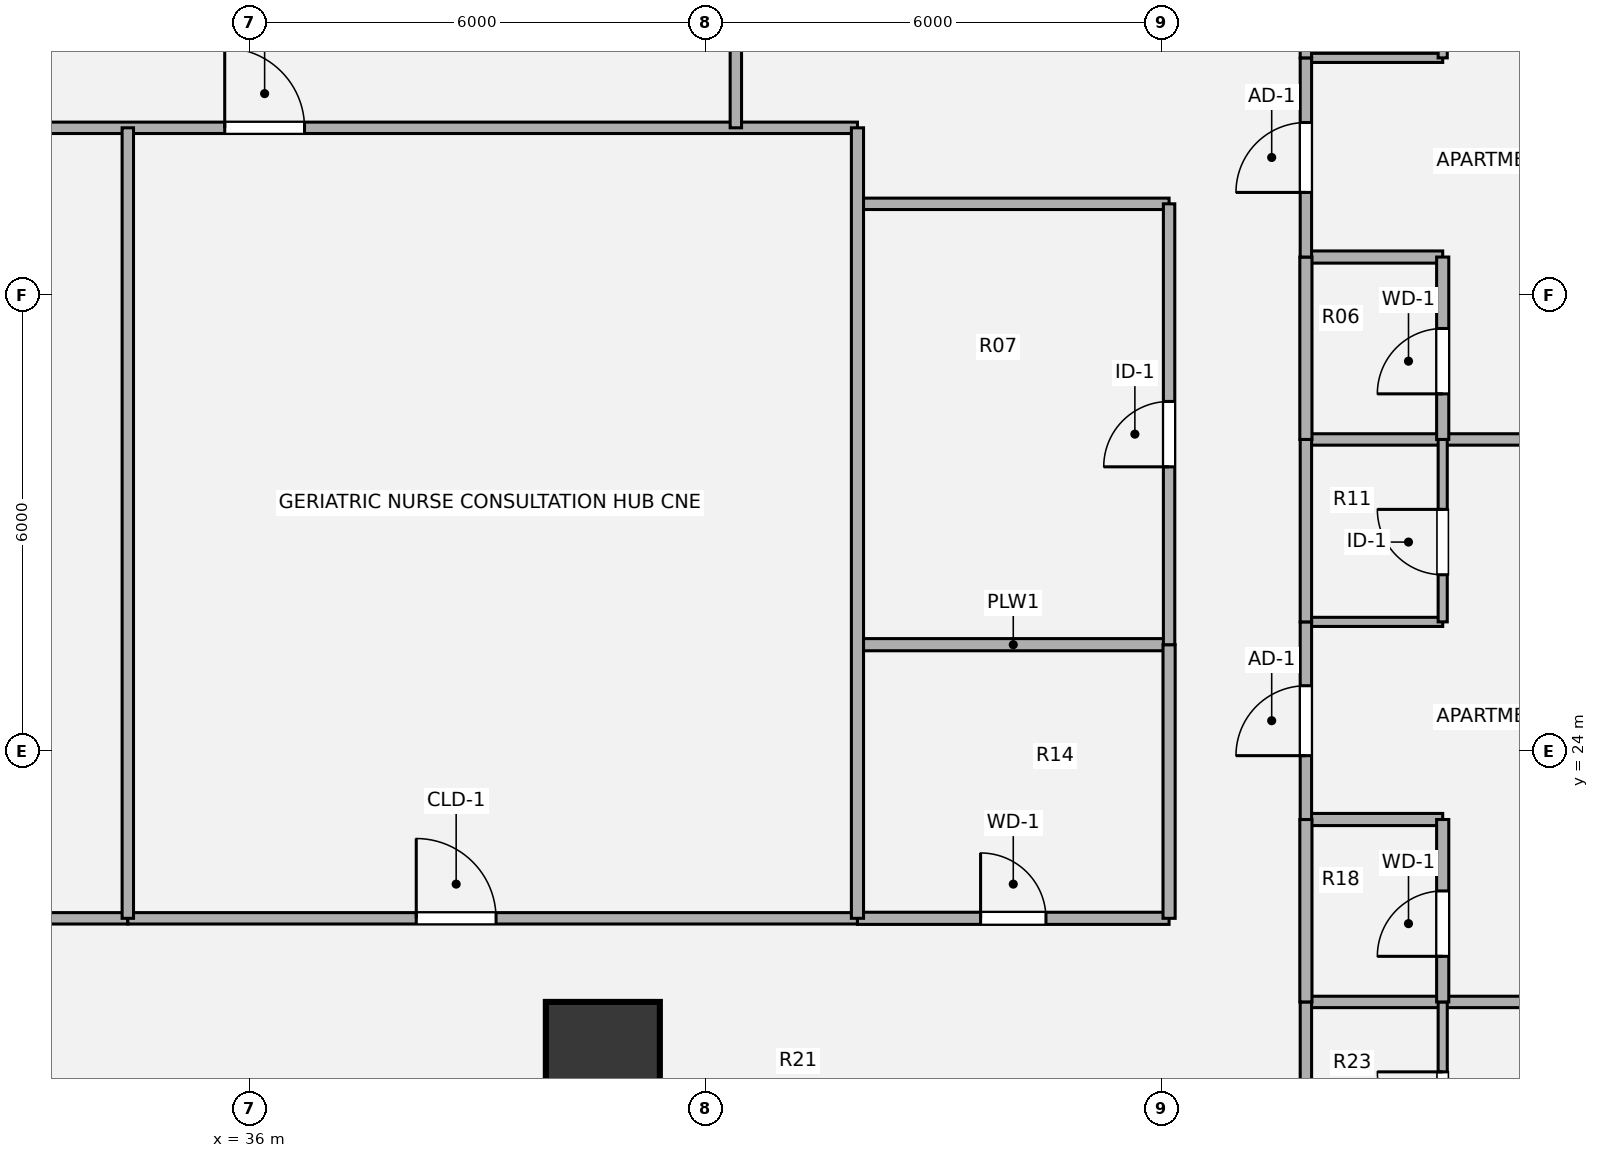
"""IFC4 building model, lengths in metres.
Left out: names, types, materials, properties, quantities, classifications, styles, units other than length and angle.
Written with IfcOpenShell. Run it as: python <this file> out.ifc"""

import sys

from ifc_helpers import new_model, si_unit, direction, frame, frame_2d, origin, origin_2d, place, context, subcontext, project, spatial, rectangle, hollow_circle, extrude, source, transform, mapped, element, fill, save


model = new_model("IFC4")
c1 = context("Model", 3, precision=1e-05, world=origin(), true_north=direction((0.0, 1.0)))
c2 = subcontext(c1, "Body", "Model", "MODEL_VIEW")
j1 = project(units=[si_unit("LENGTHUNIT", "METRE"), si_unit("PLANEANGLEUNIT", "RADIAN")], contexts=[c1])
p1 = place(None, origin())
s1 = spatial("IfcSite", under=j1, at=p1, CompositionType="ELEMENT")
p2 = place(p1, origin())
s2 = spatial("IfcBuilding", under=s1, at=p2, CompositionType="ELEMENT")
p3 = place(p2, frame((0.0, 0.0, 30.78)))
s3 = spatial("IfcBuildingStorey", under=s2, at=p3, CompositionType="ELEMENT", Elevation=30.78)
m1 = source(origin(), c2, "Body", "SweptSolid", [
    extrude(hollow_circle(Radius=0.75, WallThickness=0.05, at=origin_2d()), origin(), (0.0, 0.0, 1.0), 3.78),
])
p4 = place(p3, frame((40.65, 19.95, 0.0), z_axis=(0.0, 0.0, 1.0), x_axis=(1.0, 0.0, 0.0)))
e1 = element("IfcColumn", 1, at=p4, inside=s3, PredefinedType="COLUMN", context=c2, shape_type="MappedRepresentation", body=[
    mapped(m1, transform((0.0, 0.0, 0.0), x_axis=(1.0, 0.0, 0.0), y_axis=(0.0, 1.0, 0.0), z_axis=(0.0, 0.0, 1.0), scale=1.0)),
])
p5 = place(p3, frame((49.9, 20.7, 0.0), z_axis=(0.0, 0.0, 1.0), x_axis=(1.0, 0.0, 0.0)))
e2 = element("IfcWall", 2, at=p5, inside=s3, PredefinedType="PARTITIONING", context=c2, shape_type="SweptSolid", body=[
    extrude(rectangle(XDim=10.02, YDim=0.15, at=frame_2d((5.01, 0.0))), origin(), (0.0, 0.0, 1.0), 2.982),
])
p6 = place(p3, frame((23.9, 21.8, 0.0), z_axis=(0.0, 0.0, 1.0), x_axis=(1.0, 0.0, 0.0)))
e3 = element("IfcWall", 3, at=p6, inside=s3, PredefinedType="PARTITIONING", context=c2, shape_type="SweptSolid", body=[
    extrude(rectangle(XDim=10.5, YDim=0.15, at=frame_2d((5.25, 0.0))), origin(), (0.0, 0.0, 1.0), 2.982),
])
p7 = place(p6, frame((4.875, 0.0, 0.0)))
e4 = element("IfcOpeningElement", 4, at=p7, cuts=e3, PredefinedType="OPENING", context=c2, shape_type="SweptSolid", body=[
    extrude(rectangle(XDim=1.05, YDim=2.1, at=origin_2d()), frame((0.525, 0.085, 1.05), z_axis=(0.0, -1.0, 0.0), x_axis=(1.0, 0.0, 0.0)), (0.0, 0.0, 1.0), 0.17),
])
p8 = place(p3, frame((34.4, 21.8, 0.0), z_axis=(0.0, 0.0, 1.0), x_axis=(1.0, 0.0, 0.0)))
e5 = element("IfcWall", 5, at=p8, inside=s3, PredefinedType="PARTITIONING", context=c2, shape_type="SweptSolid", body=[
    extrude(rectangle(XDim=9.6, YDim=0.15, at=frame_2d((4.8, 0.0))), origin(), (0.0, 0.0, 1.0), 2.982),
])
p9 = place(p8, frame((3.795, 0.0, 0.0)))
e6 = element("IfcOpeningElement", 6, at=p9, cuts=e5, PredefinedType="OPENING", context=c2, shape_type="SweptSolid", body=[
    extrude(rectangle(XDim=1.05, YDim=2.1, at=origin_2d()), frame((0.525, 0.085, 1.05), z_axis=(0.0, -1.0, 0.0), x_axis=(1.0, 0.0, 0.0)), (0.0, 0.0, 1.0), 0.17),
])
p10 = place(p3, frame((44.0, 21.8, 0.0), z_axis=(0.0, 0.0, 1.0), x_axis=(1.0, 0.0, 0.0)))
e7 = element("IfcWall", 7, at=p10, inside=s3, PredefinedType="PLUMBINGWALL", context=c2, shape_type="SweptSolid", body=[
    extrude(rectangle(XDim=4.1, YDim=0.16, at=frame_2d((2.05, 0.0))), origin(), (0.0, 0.0, 1.0), 2.982),
])
p11 = place(p10, frame((1.62, 0.0, 0.0)))
e8 = element("IfcOpeningElement", 8, at=p11, cuts=e7, PredefinedType="OPENING", context=c2, shape_type="SweptSolid", body=[
    extrude(rectangle(XDim=0.86, YDim=2.1, at=origin_2d()), frame((0.43, 0.09, 1.05), z_axis=(0.0, -1.0, 0.0), x_axis=(1.0, 0.0, 0.0)), (0.0, 0.0, 1.0), 0.18),
])
p12 = place(p3, frame((49.9, 23.1, 0.0), z_axis=(0.0, 0.0, 1.0), x_axis=(1.0, 0.0, 0.0)))
e9 = element("IfcWall", 9, at=p12, inside=s3, PredefinedType="PLUMBINGWALL", context=c2, shape_type="SweptSolid", body=[
    extrude(rectangle(XDim=1.8, YDim=0.16, at=frame_2d((0.9, 0.0))), origin(), (0.0, 0.0, 1.0), 3.055),
])
p13 = place(p3, frame((44.0, 25.4, 0.0), z_axis=(0.0, 0.0, 1.0), x_axis=(1.0, 0.0, 0.0)))
e10 = element("IfcWall", 10, at=p13, inside=s3, PredefinedType="PLUMBINGWALL", context=c2, shape_type="SweptSolid", body=[
    extrude(rectangle(XDim=4.1, YDim=0.16, at=frame_2d((2.05, 0.0))), origin(), (0.0, 0.0, 1.0), 3.055),
])
p14 = place(p3, frame((49.9, 25.7, 0.0), z_axis=(0.0, 0.0, 1.0), x_axis=(1.0, 0.0, 0.0)))
e11 = element("IfcWall", 11, at=p14, inside=s3, PredefinedType="PARTITIONING", context=c2, shape_type="SweptSolid", body=[
    extrude(rectangle(XDim=1.8, YDim=0.12, at=frame_2d((0.9, 0.0))), origin(), (0.0, 0.0, 1.0), 2.982),
])
p15 = place(p3, frame((49.9, 28.1, 0.0), z_axis=(0.0, 0.0, 1.0), x_axis=(1.0, 0.0, 0.0)))
e12 = element("IfcWall", 12, at=p15, inside=s3, PredefinedType="PARTITIONING", context=c2, shape_type="SweptSolid", body=[
    extrude(rectangle(XDim=10.02, YDim=0.15, at=frame_2d((5.01, 0.0))), origin(), (0.0, 0.0, 1.0), 2.982),
])
p16 = place(p3, frame((49.9, 30.5, 0.0), z_axis=(0.0, 0.0, 1.0), x_axis=(1.0, 0.0, 0.0)))
e13 = element("IfcWall", 13, at=p16, inside=s3, PredefinedType="PLUMBINGWALL", context=c2, shape_type="SweptSolid", body=[
    extrude(rectangle(XDim=1.8, YDim=0.16, at=frame_2d((0.9, 0.0))), origin(), (0.0, 0.0, 1.0), 2.903),
])
p17 = place(p3, frame((44.0, 31.2, 0.0), z_axis=(0.0, 0.0, 1.0), x_axis=(1.0, 0.0, 0.0)))
e14 = element("IfcWall", 14, at=p17, inside=s3, PredefinedType="PARTITIONING", context=c2, shape_type="SweptSolid", body=[
    extrude(rectangle(XDim=4.1, YDim=0.15, at=frame_2d((2.05, 0.0))), origin(), (0.0, 0.0, 1.0), 3.5),
])
p18 = place(p3, frame((23.9, 32.2, 0.0), z_axis=(0.0, 0.0, 1.0), x_axis=(1.0, 0.0, 0.0)))
e15 = element("IfcWall", 15, at=p18, inside=s3, PredefinedType="PARTITIONING", context=c2, shape_type="SweptSolid", body=[
    extrude(rectangle(XDim=20.1, YDim=0.15, at=frame_2d((10.05, 0.0))), origin(), (0.0, 0.0, 1.0), 3.259),
])
p19 = place(p18, frame((11.775, 0.0, 0.0)))
e16 = element("IfcOpeningElement", 16, at=p19, cuts=e15, PredefinedType="OPENING", context=c2, shape_type="SweptSolid", body=[
    extrude(rectangle(XDim=1.05, YDim=2.1, at=origin_2d()), frame((0.525, 0.085, 1.05), z_axis=(0.0, -1.0, 0.0), x_axis=(1.0, 0.0, 0.0)), (0.0, 0.0, 1.0), 0.17),
])
p20 = place(p3, frame((49.9, 33.12, 0.0), z_axis=(0.0, 0.0, 1.0), x_axis=(1.0, 0.0, 0.0)))
e17 = element("IfcWall", 17, at=p20, inside=s3, PredefinedType="PARTITIONING", context=c2, shape_type="SweptSolid", body=[
    extrude(rectangle(XDim=1.8, YDim=0.12, at=frame_2d((0.9, 0.0))), origin(), (0.0, 0.0, 1.0), 3.055),
])
p21 = place(p3, frame((34.4, 21.8, 0.0), z_axis=(0.0, 0.0, 1.0), x_axis=(0.0, 1.0, 0.0)))
e18 = element("IfcWall", 18, at=p21, inside=s3, PredefinedType="PARTITIONING", context=c2, shape_type="SweptSolid", body=[
    extrude(rectangle(XDim=10.4, YDim=0.15, at=frame_2d((5.2, 0.0))), origin(), (0.0, 0.0, 1.0), 3.5),
])
p22 = place(p3, frame((42.4, 32.2, 0.0), z_axis=(0.0, 0.0, 1.0), x_axis=(0.0, 1.0, 0.0)))
e19 = element("IfcWall", 19, at=p22, inside=s3, PredefinedType="PARTITIONING", context=c2, shape_type="SweptSolid", body=[
    extrude(rectangle(XDim=4.595, YDim=0.15, at=frame_2d((2.298, 0.0))), origin(), (0.0, 0.0, 1.0), 3.5),
])
p23 = place(p3, frame((44.0, 21.8, 0.0), z_axis=(0.0, 0.0, 1.0), x_axis=(0.0, 1.0, 0.0)))
e20 = element("IfcWall", 20, at=p23, inside=s3, PredefinedType="PLUMBINGWALL", context=c2, shape_type="SweptSolid", body=[
    extrude(rectangle(XDim=10.4, YDim=0.16, at=frame_2d((5.2, 0.0))), origin(), (0.0, 0.0, 1.0), 3.5),
])
p24 = place(p3, frame((48.1, 21.8, 0.0), z_axis=(0.0, 0.0, 1.0), x_axis=(0.0, 1.0, 0.0)))
e21 = element("IfcWall", 21, at=p24, inside=s3, PredefinedType="PLUMBINGWALL", context=c2, shape_type="SweptSolid", body=[
    extrude(rectangle(XDim=3.6, YDim=0.16, at=frame_2d((1.8, 0.0))), origin(), (0.0, 0.0, 1.0), 3.5),
])
p25 = place(p3, frame((48.1, 25.4, 0.0), z_axis=(0.0, 0.0, 1.0), x_axis=(0.0, 1.0, 0.0)))
e22 = element("IfcWall", 22, at=p25, inside=s3, PredefinedType="PARTITIONING", context=c2, shape_type="SweptSolid", body=[
    extrude(rectangle(XDim=5.8, YDim=0.15, at=frame_2d((2.9, 0.0))), origin(), (0.0, 0.0, 1.0), 3.5),
])
p26 = place(p25, frame((2.34, 0.0, 0.0)))
e23 = element("IfcOpeningElement", 23, at=p26, cuts=e22, PredefinedType="OPENING", context=c2, shape_type="SweptSolid", body=[
    extrude(rectangle(XDim=0.86, YDim=2.1, at=origin_2d()), frame((0.43, 0.085, 1.05), z_axis=(0.0, -1.0, 0.0), x_axis=(1.0, 0.0, 0.0)), (0.0, 0.0, 1.0), 0.17),
])
p27 = place(p3, frame((49.9, 18.3, 0.0), z_axis=(0.0, 0.0, 1.0), x_axis=(0.0, 1.0, 0.0)))
e24 = element("IfcWall", 24, at=p27, inside=s3, PredefinedType="PARTITIONING", context=c2, shape_type="SweptSolid", body=[
    extrude(rectangle(XDim=2.4, YDim=0.15, at=frame_2d((1.2, 0.0))), origin(), (0.0, 0.0, 1.0), 3.5),
])
p28 = place(p3, frame((49.9, 20.7, 0.0), z_axis=(0.0, 0.0, 1.0), x_axis=(0.0, 1.0, 0.0)))
e25 = element("IfcWall", 25, at=p28, inside=s3, PredefinedType="PLUMBINGWALL", context=c2, shape_type="SweptSolid", body=[
    extrude(rectangle(XDim=2.4, YDim=0.16, at=frame_2d((1.2, 0.0))), origin(), (0.0, 0.0, 1.0), 3.5),
])
p29 = place(p3, frame((49.9, 23.1, 0.0), z_axis=(0.0, 0.0, 1.0), x_axis=(0.0, 1.0, 0.0)))
e26 = element("IfcWall", 26, at=p29, inside=s3, PredefinedType="PARTITIONING", context=c2, shape_type="SweptSolid", body=[
    extrude(rectangle(XDim=2.6, YDim=0.15, at=frame_2d((1.3, 0.0))), origin(), (0.0, 0.0, 1.0), 3.5),
])
p30 = place(p29, frame((0.84, 0.0, 0.0)))
e27 = element("IfcOpeningElement", 27, at=p30, cuts=e26, PredefinedType="OPENING", context=c2, shape_type="SweptSolid", body=[
    extrude(rectangle(XDim=0.92, YDim=2.1, at=origin_2d()), frame((0.46, 0.085, 1.05), z_axis=(0.0, -1.0, 0.0), x_axis=(1.0, 0.0, 0.0)), (0.0, 0.0, 1.0), 0.17),
])
p31 = place(p3, frame((49.9, 25.7, 0.0), z_axis=(0.0, 0.0, 1.0), x_axis=(0.0, 1.0, 0.0)))
e28 = element("IfcWall", 28, at=p31, inside=s3, PredefinedType="PARTITIONING", context=c2, shape_type="SweptSolid", body=[
    extrude(rectangle(XDim=2.4, YDim=0.15, at=frame_2d((1.2, 0.0))), origin(), (0.0, 0.0, 1.0), 3.5),
])
p32 = place(p3, frame((49.9, 28.1, 0.0), z_axis=(0.0, 0.0, 1.0), x_axis=(0.0, 1.0, 0.0)))
e29 = element("IfcWall", 29, at=p32, inside=s3, PredefinedType="PLUMBINGWALL", context=c2, shape_type="SweptSolid", body=[
    extrude(rectangle(XDim=2.4, YDim=0.16, at=frame_2d((1.2, 0.0))), origin(), (0.0, 0.0, 1.0), 3.5),
])
p33 = place(p3, frame((49.9, 30.5, 0.0), z_axis=(0.0, 0.0, 1.0), x_axis=(0.0, 1.0, 0.0)))
e30 = element("IfcWall", 30, at=p33, inside=s3, PredefinedType="PARTITIONING", context=c2, shape_type="SweptSolid", body=[
    extrude(rectangle(XDim=2.62, YDim=0.15, at=frame_2d((1.31, 0.0))), origin(), (0.0, 0.0, 1.0), 3.5),
])
p34 = place(p33, frame((0.85, 0.0, 0.0)))
e31 = element("IfcOpeningElement", 31, at=p34, cuts=e30, PredefinedType="OPENING", context=c2, shape_type="SweptSolid", body=[
    extrude(rectangle(XDim=0.92, YDim=2.1, at=origin_2d()), frame((0.46, 0.085, 1.05), z_axis=(0.0, -1.0, 0.0), x_axis=(1.0, 0.0, 0.0)), (0.0, 0.0, 1.0), 0.17),
])
p35 = place(p3, frame((49.9, 33.12, 0.0), z_axis=(0.0, 0.0, 1.0), x_axis=(0.0, 1.0, 0.0)))
e32 = element("IfcWall", 32, at=p35, inside=s3, PredefinedType="PARTITIONING", context=c2, shape_type="SweptSolid", body=[
    extrude(rectangle(XDim=2.8, YDim=0.15, at=frame_2d((1.4, 0.0))), origin(), (0.0, 0.0, 1.0), 3.5),
])
p36 = place(p3, frame((51.7, 18.3, 0.0), z_axis=(0.0, 0.0, 1.0), x_axis=(0.0, 1.0, 0.0)))
e33 = element("IfcWall", 33, at=p36, inside=s3, PredefinedType="PARTITIONING", context=c2, shape_type="SweptSolid", body=[
    extrude(rectangle(XDim=2.4, YDim=0.12, at=frame_2d((1.2, 0.0))), origin(), (0.0, 0.0, 1.0), 3.5),
])
p37 = place(p36, frame((0.62, 0.0, 0.0)))
e34 = element("IfcOpeningElement", 34, at=p37, cuts=e33, PredefinedType="OPENING", context=c2, shape_type="SweptSolid", body=[
    extrude(rectangle(XDim=0.86, YDim=2.1, at=origin_2d()), frame((0.43, 0.07, 1.05), z_axis=(0.0, -1.0, 0.0), x_axis=(1.0, 0.0, 0.0)), (0.0, 0.0, 1.0), 0.14),
])
p38 = place(p3, frame((51.7, 20.7, 0.0), z_axis=(0.0, 0.0, 1.0), x_axis=(0.0, 1.0, 0.0)))
e35 = element("IfcWall", 35, at=p38, inside=s3, PredefinedType="PLUMBINGWALL", context=c2, shape_type="SweptSolid", body=[
    extrude(rectangle(XDim=2.4, YDim=0.16, at=frame_2d((1.2, 0.0))), origin(), (0.0, 0.0, 1.0), 3.5),
])
p39 = place(p38, frame((0.6, 0.0, 0.0)))
e36 = element("IfcOpeningElement", 36, at=p39, cuts=e35, PredefinedType="OPENING", context=c2, shape_type="SweptSolid", body=[
    extrude(rectangle(XDim=0.86, YDim=2.1, at=origin_2d()), frame((0.43, 0.09, 1.05), z_axis=(0.0, -1.0, 0.0), x_axis=(1.0, 0.0, 0.0)), (0.0, 0.0, 1.0), 0.18),
])
p40 = place(p3, frame((51.7, 25.7, 0.0), z_axis=(0.0, 0.0, 1.0), x_axis=(0.0, 1.0, 0.0)))
e37 = element("IfcWall", 37, at=p40, inside=s3, PredefinedType="PARTITIONING", context=c2, shape_type="SweptSolid", body=[
    extrude(rectangle(XDim=2.4, YDim=0.12, at=frame_2d((1.2, 0.0))), origin(), (0.0, 0.0, 1.0), 3.5),
])
p41 = place(p40, frame((0.62, 0.0, 0.0)))
e38 = element("IfcOpeningElement", 38, at=p41, cuts=e37, PredefinedType="OPENING", context=c2, shape_type="SweptSolid", body=[
    extrude(rectangle(XDim=0.86, YDim=2.1, at=origin_2d()), frame((0.43, 0.07, 1.05), z_axis=(0.0, -1.0, 0.0), x_axis=(1.0, 0.0, 0.0)), (0.0, 0.0, 1.0), 0.14),
])
p42 = place(p3, frame((51.7, 28.1, 0.0), z_axis=(0.0, 0.0, 1.0), x_axis=(0.0, 1.0, 0.0)))
e39 = element("IfcWall", 39, at=p42, inside=s3, PredefinedType="PLUMBINGWALL", context=c2, shape_type="SweptSolid", body=[
    extrude(rectangle(XDim=2.4, YDim=0.16, at=frame_2d((1.2, 0.0))), origin(), (0.0, 0.0, 1.0), 3.5),
])
p43 = place(p42, frame((0.6, 0.0, 0.0)))
e40 = element("IfcOpeningElement", 40, at=p43, cuts=e39, PredefinedType="OPENING", context=c2, shape_type="SweptSolid", body=[
    extrude(rectangle(XDim=0.86, YDim=2.1, at=origin_2d()), frame((0.43, 0.09, 1.05), z_axis=(0.0, -1.0, 0.0), x_axis=(1.0, 0.0, 0.0)), (0.0, 0.0, 1.0), 0.18),
])
p44 = place(p3, frame((51.7, 33.12, 0.0), z_axis=(0.0, 0.0, 1.0), x_axis=(0.0, 1.0, 0.0)))
e41 = element("IfcWall", 41, at=p44, inside=s3, PredefinedType="PARTITIONING", context=c2, shape_type="SweptSolid", body=[
    extrude(rectangle(XDim=2.4, YDim=0.12, at=frame_2d((1.2, 0.0))), origin(), (0.0, 0.0, 1.0), 3.5),
])
p45 = place(p44, frame((0.62, 0.0, 0.0)))
e42 = element("IfcOpeningElement", 42, at=p45, cuts=e41, PredefinedType="OPENING", context=c2, shape_type="SweptSolid", body=[
    extrude(rectangle(XDim=0.86, YDim=2.1, at=origin_2d()), frame((0.43, 0.07, 1.05), z_axis=(0.0, -1.0, 0.0), x_axis=(1.0, 0.0, 0.0)), (0.0, 0.0, 1.0), 0.14),
])
m2 = source(origin(), c2, "Body", "SweptSolid", [
    extrude(rectangle(XDim=1.05, YDim=2.1, at=origin_2d()), frame((0.525, 0.025, 1.05), z_axis=(0.0, -1.0, 0.0), x_axis=(1.0, 0.0, 0.0)), (0.0, 0.0, 1.0), 0.05),
])
p46 = place(p9, origin())
e43 = element("IfcDoor", 43, at=p46, inside=s3, OperationType="SINGLE_SWING_LEFT", PredefinedType="DOOR", context=c2, shape_type="MappedRepresentation", body=[
    mapped(m2, transform((0.0, 0.0, 0.0), x_axis=(1.0, 0.0, 0.0), y_axis=(0.0, 1.0, 0.0), z_axis=(0.0, 0.0, 1.0), scale=1.0)),
])
fill(e6, e43)
m3 = source(origin(), c2, "Body", "SweptSolid", [
    extrude(rectangle(XDim=0.86, YDim=2.1, at=origin_2d()), frame((0.43, 0.025, 1.05), z_axis=(0.0, -1.0, 0.0), x_axis=(1.0, 0.0, 0.0)), (0.0, 0.0, 1.0), 0.05),
])
p47 = place(p11, origin())
e44 = element("IfcDoor", 44, at=p47, inside=s3, OperationType="SINGLE_SWING_LEFT", PredefinedType="DOOR", context=c2, shape_type="MappedRepresentation", body=[
    mapped(m3, transform((0.0, 0.0, 0.0), x_axis=(1.0, 0.0, 0.0), y_axis=(0.0, 1.0, 0.0), z_axis=(0.0, 0.0, 1.0), scale=1.0)),
])
fill(e8, e44)
p48 = place(p19, origin())
e45 = element("IfcDoor", 45, at=p48, inside=s3, OperationType="SINGLE_SWING_LEFT", PredefinedType="DOOR", context=c2, shape_type="MappedRepresentation", body=[
    mapped(m2, transform((0.0, 0.0, 0.0), x_axis=(1.0, 0.0, 0.0), y_axis=(0.0, 1.0, 0.0), z_axis=(0.0, 0.0, 1.0), scale=1.0)),
])
fill(e16, e45)
m4 = source(origin(), c2, "Body", "SweptSolid", [
    extrude(rectangle(XDim=0.86, YDim=2.1, at=origin_2d()), frame((0.43, 0.025, 1.05), z_axis=(0.0, -1.0, 0.0), x_axis=(1.0, 0.0, 0.0)), (0.0, 0.0, 1.0), 0.05),
])
p49 = place(p26, origin())
e46 = element("IfcDoor", 46, at=p49, inside=s3, OperationType="SINGLE_SWING_LEFT", PredefinedType="DOOR", context=c2, shape_type="MappedRepresentation", body=[
    mapped(m4, transform((0.0, 0.0, 0.0), x_axis=(1.0, 0.0, 0.0), y_axis=(0.0, 1.0, 0.0), z_axis=(0.0, 0.0, 1.0), scale=1.0)),
])
fill(e23, e46)
m5 = source(origin(), c2, "Body", "SweptSolid", [
    extrude(rectangle(XDim=0.92, YDim=2.1, at=origin_2d()), frame((0.46, 0.025, 1.05), z_axis=(0.0, -1.0, 0.0), x_axis=(1.0, 0.0, 0.0)), (0.0, 0.0, 1.0), 0.05),
])
p50 = place(p30, origin())
e47 = element("IfcDoor", 47, at=p50, inside=s3, OperationType="SINGLE_SWING_LEFT", PredefinedType="DOOR", context=c2, shape_type="MappedRepresentation", body=[
    mapped(m5, transform((0.0, 0.0, 0.0), x_axis=(1.0, 0.0, 0.0), y_axis=(0.0, 1.0, 0.0), z_axis=(0.0, 0.0, 1.0), scale=1.0)),
])
fill(e27, e47)
p51 = place(p34, origin())
e48 = element("IfcDoor", 48, at=p51, inside=s3, OperationType="SINGLE_SWING_LEFT", PredefinedType="DOOR", context=c2, shape_type="MappedRepresentation", body=[
    mapped(m5, transform((0.0, 0.0, 0.0), x_axis=(1.0, 0.0, 0.0), y_axis=(0.0, 1.0, 0.0), z_axis=(0.0, 0.0, 1.0), scale=1.0)),
])
fill(e31, e48)
p52 = place(p37, origin())
e49 = element("IfcDoor", 49, at=p52, inside=s3, OperationType="SINGLE_SWING_RIGHT", PredefinedType="DOOR", context=c2, shape_type="MappedRepresentation", body=[
    mapped(m4, transform((0.0, 0.0, 0.0), x_axis=(1.0, 0.0, 0.0), y_axis=(0.0, 1.0, 0.0), z_axis=(0.0, 0.0, 1.0), scale=1.0)),
])
fill(e34, e49)
p53 = place(p39, origin())
e50 = element("IfcDoor", 50, at=p53, inside=s3, OperationType="SINGLE_SWING_LEFT", PredefinedType="DOOR", context=c2, shape_type="MappedRepresentation", body=[
    mapped(m3, transform((0.0, 0.0, 0.0), x_axis=(1.0, 0.0, 0.0), y_axis=(0.0, 1.0, 0.0), z_axis=(0.0, 0.0, 1.0), scale=1.0)),
])
fill(e36, e50)
p54 = place(p41, origin())
e51 = element("IfcDoor", 51, at=p54, inside=s3, OperationType="SINGLE_SWING_RIGHT", PredefinedType="DOOR", context=c2, shape_type="MappedRepresentation", body=[
    mapped(m4, transform((0.0, 0.0, 0.0), x_axis=(1.0, 0.0, 0.0), y_axis=(0.0, 1.0, 0.0), z_axis=(0.0, 0.0, 1.0), scale=1.0)),
])
fill(e38, e51)
p55 = place(p43, origin())
e52 = element("IfcDoor", 52, at=p55, inside=s3, OperationType="SINGLE_SWING_LEFT", PredefinedType="DOOR", context=c2, shape_type="MappedRepresentation", body=[
    mapped(m3, transform((0.0, 0.0, 0.0), x_axis=(1.0, 0.0, 0.0), y_axis=(0.0, 1.0, 0.0), z_axis=(0.0, 0.0, 1.0), scale=1.0)),
])
fill(e40, e52)
save(model, sys.argv[1])
